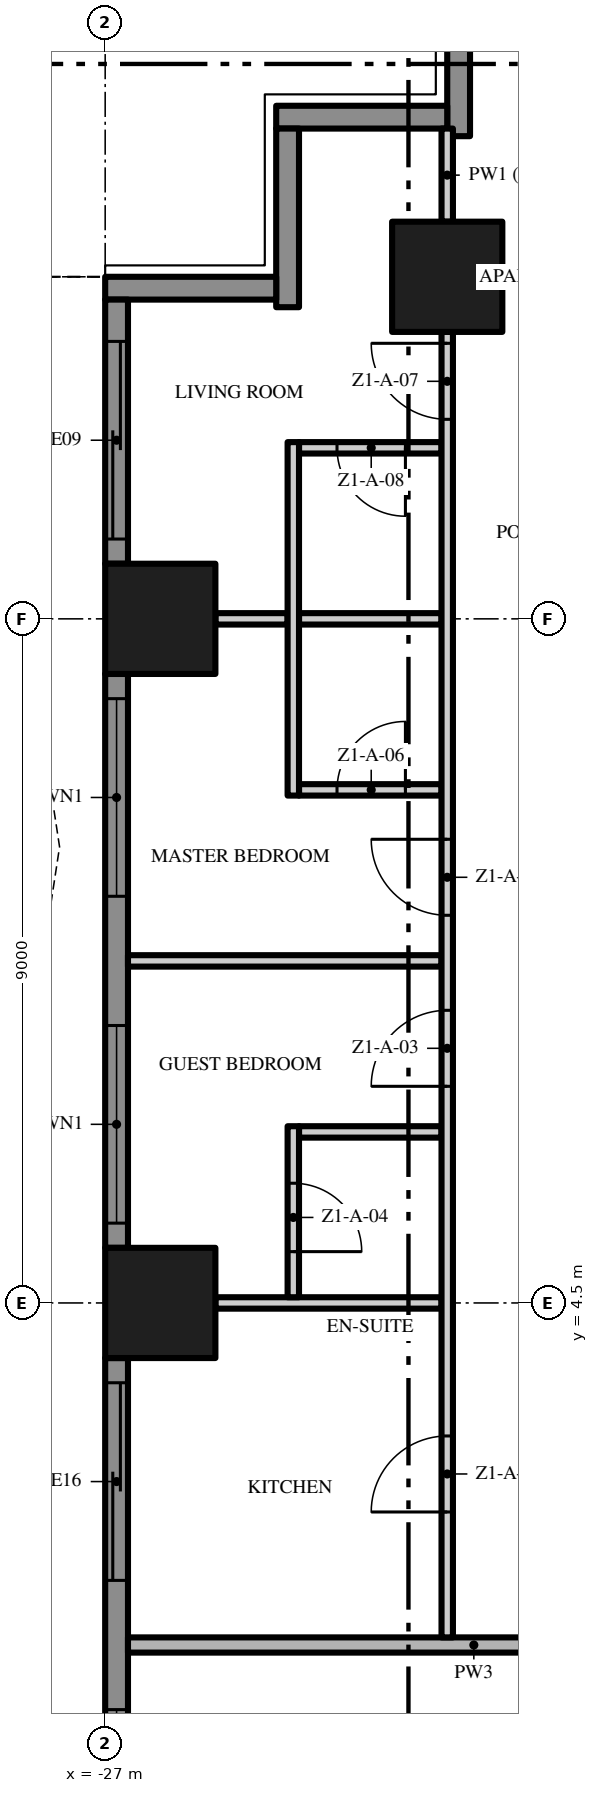
"""IFC4 building model, lengths in metres.
Left out: names, types, materials, properties, quantities, classifications, styles, units other than length and angle.
Written with IfcOpenShell. Run it as: python <this file> out.ifc"""

import sys

from ifc_helpers import new_model, si_unit, direction, frame, frame_2d, origin, origin_2d, place, context, subcontext, project, spatial, polyline, rectangle, outline, extrude, element, fill, save


model = new_model("IFC4")
c1 = context("Model", 3, precision=1e-05, world=origin(), true_north=direction((0.0, 1.0)))
c2 = subcontext(c1, "Body", "Model", "MODEL_VIEW")
j1 = project(units=[si_unit("LENGTHUNIT", "METRE"), si_unit("PLANEANGLEUNIT", "RADIAN")], contexts=[c1])
p1 = place(None, origin())
s1 = spatial("IfcSite", under=j1, at=p1, CompositionType="ELEMENT")
p2 = place(p1, origin())
s2 = spatial("IfcBuilding", under=s1, at=p2, CompositionType="ELEMENT")
p3 = place(p2, frame((0.0, 0.0, 22.6)))
s3 = spatial("IfcBuildingStorey", under=s2, at=p3, CompositionType="ELEMENT", Elevation=22.6)
for number, where, z_axis, x_axis in (
    (1, (-26.275, 13.5, 0.0), (0.0, 0.0, 1.0), (1.0, 0.0, 0.0)),
    (2, (-22.5, 18.0, 0.0), (0.0, 0.0, 1.0), (1.0, 0.0, 0.0)),
    (3, (-26.275, 4.5, 0.0), (0.0, 0.0, 1.0), (1.0, 0.0, 0.0)),
):
    element("IfcColumn", number, at=place(p3, frame(where, z_axis=z_axis, x_axis=x_axis)), inside=s3, PredefinedType="COLUMN", context=c2, shape_type="SweptSolid", body=[
        extrude(rectangle(XDim=1.45, YDim=1.45, at=origin_2d()), origin(), (0.0, 0.0, 1.0), 3.5),
    ])
p4 = place(p3, frame((-22.35, 19.85, 0.0), z_axis=(0.0, 0.0, 1.0), x_axis=(0.0, 1.0, 0.0)))
e4 = element("IfcWall", 4, at=p4, inside=s3, PredefinedType="SOLIDWALL", context=c2, shape_type="SweptSolid", body=[
    extrude(rectangle(XDim=2.35, YDim=0.3, at=frame_2d((1.175, 0.0))), origin(), (0.0, 0.0, 1.0), 3.5),
])
p5 = place(p3, frame((-24.75, 20.1, 0.0), z_axis=(0.0, 0.0, 1.0), x_axis=(1.0, 0.0, 0.0)))
e5 = element("IfcWall", 5, at=p5, inside=s3, PredefinedType="SOLIDWALL", context=c2, shape_type="SweptSolid", body=[
    extrude(rectangle(XDim=2.25, YDim=0.3, at=frame_2d((1.125, 0.0))), origin(), (0.0, 0.0, 1.0), 3.5),
])
p6 = place(p3, frame((-24.6, 17.6, 0.0), z_axis=(0.0, 0.0, 1.0), x_axis=(0.0, 1.0, 0.0)))
e6 = element("IfcWall", 6, at=p6, inside=s3, PredefinedType="SOLIDWALL", context=c2, shape_type="SweptSolid", body=[
    extrude(rectangle(XDim=2.35, YDim=0.3, at=frame_2d((1.175, 0.0))), origin(), (0.0, 0.0, 1.0), 3.5),
])
p7 = place(p3, frame((-27.0, 17.85, 0.0), z_axis=(0.0, 0.0, 1.0), x_axis=(1.0, 0.0, 0.0)))
e7 = element("IfcWall", 7, at=p7, inside=s3, PredefinedType="SOLIDWALL", context=c2, shape_type="SweptSolid", body=[
    extrude(rectangle(XDim=2.25, YDim=0.3, at=frame_2d((1.125, 0.0))), origin(), (0.0, 0.0, 1.0), 3.5),
])
p8 = place(p3, frame((-26.85, 14.225, 0.0), z_axis=(0.0, 0.0, 1.0), x_axis=(0.0, 1.0, 0.0)))
e8 = element("IfcWall", 8, at=p8, inside=s3, PredefinedType="SOLIDWALL", context=c2, shape_type="SweptSolid", body=[
    extrude(rectangle(XDim=3.475, YDim=0.3, at=frame_2d((1.738, 0.0))), origin(), (0.0, 0.0, 1.0), 3.5),
])
p9 = place(p8, frame((0.325, 0.0, 0.0)))
e9 = element("IfcOpeningElement", 9, at=p9, cuts=e8, PredefinedType="OPENING", context=c2, shape_type="SweptSolid", body=[
    extrude(rectangle(XDim=2.6, YDim=2.4, at=frame_2d((1.3, 1.2))), frame((0.0, 0.16, 0.0), z_axis=(0.0, -1.0, 0.0), x_axis=(1.0, 0.0, 0.0)), (0.0, 0.0, 1.0), 0.32),
])
p10 = place(p3, frame((-26.85, 5.225, 0.0), z_axis=(0.0, 0.0, 1.0), x_axis=(0.0, 1.0, 0.0)))
e10 = element("IfcWall", 10, at=p10, inside=s3, PredefinedType="SOLIDWALL", context=c2, shape_type="SweptSolid", body=[
    extrude(rectangle(XDim=7.55, YDim=0.3, at=frame_2d((3.775, 0.0))), origin(), (0.0, 0.0, 1.0), 3.5),
])
p11 = place(p10, frame((4.625, 0.0, 0.45)))
e11 = element("IfcOpeningElement", 11, at=p11, cuts=e10, PredefinedType="OPENING", context=c2, shape_type="SweptSolid", body=[
    extrude(rectangle(XDim=2.6, YDim=2.65, at=frame_2d((1.3, 1.325))), frame((0.0, 0.16, 0.0), z_axis=(0.0, -1.0, 0.0), x_axis=(1.0, 0.0, 0.0)), (0.0, 0.0, 1.0), 0.32),
])
p12 = place(p10, frame((0.325, 0.0, 0.45)))
e12 = element("IfcOpeningElement", 12, at=p12, cuts=e10, PredefinedType="OPENING", context=c2, shape_type="SweptSolid", body=[
    extrude(rectangle(XDim=2.6, YDim=2.65, at=frame_2d((1.3, 1.325))), frame((0.0, 0.16, 0.0), z_axis=(0.0, -1.0, 0.0), x_axis=(1.0, 0.0, 0.0)), (0.0, 0.0, 1.0), 0.32),
])
p13 = place(p3, frame((-26.85, -3.775, 0.0), z_axis=(0.0, 0.0, 1.0), x_axis=(0.0, 1.0, 0.0)))
e13 = element("IfcWall", 13, at=p13, inside=s3, PredefinedType="SOLIDWALL", context=c2, shape_type="SweptSolid", body=[
    extrude(rectangle(XDim=7.55, YDim=0.3, at=frame_2d((3.775, 0.0))), origin(), (0.0, 0.0, 1.0), 3.5),
])
p14 = place(p13, frame((4.625, 0.0, 0.0)))
e14 = element("IfcOpeningElement", 14, at=p14, cuts=e13, PredefinedType="OPENING", context=c2, shape_type="SweptSolid", body=[
    extrude(rectangle(XDim=2.6, YDim=2.4, at=frame_2d((1.3, 1.2))), frame((0.0, 0.16, 0.0), z_axis=(0.0, -1.0, 0.0), x_axis=(1.0, 0.0, 0.0)), (0.0, 0.0, 1.0), 0.32),
])
p15 = place(p13, frame((0.325, 0.0, 0.45)))
e15 = element("IfcOpeningElement", 15, at=p15, cuts=e13, PredefinedType="OPENING", context=c2, shape_type="SweptSolid", body=[
    extrude(rectangle(XDim=2.6, YDim=2.65, at=frame_2d((1.3, 1.325))), frame((0.0, 0.16, 0.0), z_axis=(0.0, -1.0, 0.0), x_axis=(1.0, 0.0, 0.0)), (0.0, 0.0, 1.0), 0.32),
])
p16 = place(p3, origin())
e16 = element("IfcWall", 16, at=p16, inside=s3, PredefinedType="USERDEFINED", context=c2, shape_type="SweptSolid", body=[
    extrude(outline(polyline([(-30.0, 18.0), (-29.771, 16.5), (-29.171, 15.0), (-28.429, 13.5), (-27.829, 12.0), (-27.6, 10.5), (-27.829, 9.0), (-28.429, 7.5), (-29.171, 6.0), (-29.771, 4.5), (-30.0, 3.0), (-29.771, 1.5), (-29.171, 0.0), (-28.429, -1.5), (-27.829, -3.0), (-27.6, -4.5), (-27.829, -6.0), (-28.429, -7.5), (-29.171, -9.0), (-29.771, -10.5), (-30.0, -12.0), (-29.771, -13.5), (-29.171, -15.0), (-28.429, -16.5), (-27.829, -18.0), (-27.597, -17.907), (-28.201, -16.398), (-28.942, -14.898), (-29.528, -13.434), (-29.747, -12.0), (-29.528, -10.566), (-28.942, -9.102), (-28.201, -7.602), (-27.586, -6.066), (-27.347, -4.5), (-27.586, -2.934), (-28.201, -1.398), (-28.942, 0.102), (-29.528, 1.566), (-29.747, 3.0), (-29.528, 4.434), (-28.942, 5.898), (-28.201, 7.398), (-27.586, 8.934), (-27.347, 10.5), (-27.586, 12.066), (-28.201, 13.602), (-28.942, 15.102), (-29.528, 16.566), (-29.753, 18.038), (-30.0, 18.0)])), origin(), (0.0, 0.0, 1.0), 0.9),
])
p17 = place(p3, frame((-26.7, 0.0, 0.0), z_axis=(0.0, 0.0, 1.0), x_axis=(1.0, 0.0, 0.0)))
e17 = element("IfcWall", 17, at=p17, inside=s3, PredefinedType="PARTITIONING", context=c2, shape_type="SweptSolid", body=[
    extrude(rectangle(XDim=9.1, YDim=0.2, at=frame_2d((4.55, 0.0))), origin(), (0.0, 0.0, 1.0), 3.5),
])
p18 = place(p3, frame((-25.55, 4.5, 0.0), z_axis=(0.0, 0.0, 1.0), x_axis=(1.0, 0.0, 0.0)))
e18 = element("IfcWall", 18, at=p18, inside=s3, PredefinedType="PARTITIONING", context=c2, shape_type="SweptSolid", body=[
    extrude(rectangle(XDim=2.975, YDim=0.15, at=frame_2d((1.488, 0.0))), origin(), (0.0, 0.0, 1.0), 3.5),
])
p19 = place(p3, frame((-24.45, 6.75, 0.0), z_axis=(0.0, 0.0, 1.0), x_axis=(1.0, 0.0, 0.0)))
e19 = element("IfcWall", 19, at=p19, inside=s3, PredefinedType="PARTITIONING", context=c2, shape_type="SweptSolid", body=[
    extrude(rectangle(XDim=1.875, YDim=0.15, at=frame_2d((0.938, 0.0))), origin(), (0.0, 0.0, 1.0), 3.5),
])
p20 = place(p3, frame((-26.7, 9.0, 0.0), z_axis=(0.0, 0.0, 1.0), x_axis=(1.0, 0.0, 0.0)))
e20 = element("IfcWall", 20, at=p20, inside=s3, PredefinedType="PARTITIONING", context=c2, shape_type="SweptSolid", body=[
    extrude(rectangle(XDim=4.125, YDim=0.15, at=frame_2d((2.062, 0.0))), origin(), (0.0, 0.0, 1.0), 3.5),
])
p21 = place(p3, frame((-24.45, 11.25, 0.0), z_axis=(0.0, 0.0, 1.0), x_axis=(1.0, 0.0, 0.0)))
e21 = element("IfcWall", 21, at=p21, inside=s3, PredefinedType="PARTITIONING", context=c2, shape_type="SweptSolid", body=[
    extrude(rectangle(XDim=1.875, YDim=0.15, at=frame_2d((0.938, 0.0))), origin(), (0.0, 0.0, 1.0), 3.5),
])
p22 = place(p21, frame((0.5, 0.0, 0.0)))
e22 = element("IfcOpeningElement", 22, at=p22, cuts=e21, PredefinedType="OPENING", context=c2, shape_type="SweptSolid", body=[
    extrude(rectangle(XDim=0.9, YDim=2.1, at=frame_2d((0.45, 1.05))), frame((0.0, 0.085, 0.0), z_axis=(0.0, -1.0, 0.0), x_axis=(1.0, 0.0, 0.0)), (0.0, 0.0, 1.0), 0.17),
])
p23 = place(p3, frame((-25.55, 13.5, 0.0), z_axis=(0.0, 0.0, 1.0), x_axis=(1.0, 0.0, 0.0)))
e23 = element("IfcWall", 23, at=p23, inside=s3, PredefinedType="PARTITIONING", context=c2, shape_type="SweptSolid", body=[
    extrude(rectangle(XDim=0.95, YDim=0.15, at=frame_2d((0.475, 0.0))), origin(), (0.0, 0.0, 1.0), 3.5),
])
p24 = place(p3, frame((-24.45, 13.5, 0.0), z_axis=(0.0, 0.0, 1.0), x_axis=(1.0, 0.0, 0.0)))
e24 = element("IfcWall", 24, at=p24, inside=s3, PredefinedType="PARTITIONING", context=c2, shape_type="SweptSolid", body=[
    extrude(rectangle(XDim=1.875, YDim=0.15, at=frame_2d((0.938, 0.0))), origin(), (0.0, 0.0, 1.0), 3.5),
])
p25 = place(p3, frame((-22.575, 15.75, 0.0), z_axis=(0.0, 0.0, 1.0), x_axis=(-1.0, 0.0, 0.0)))
e25 = element("IfcWall", 25, at=p25, inside=s3, PredefinedType="PARTITIONING", context=c2, shape_type="SweptSolid", body=[
    extrude(rectangle(XDim=1.875, YDim=0.15, at=frame_2d((0.938, 0.0))), origin(), (0.0, 0.0, 1.0), 3.5),
])
p26 = place(p25, frame((0.475, 0.0, 0.0)))
e26 = element("IfcOpeningElement", 26, at=p26, cuts=e25, PredefinedType="OPENING", context=c2, shape_type="SweptSolid", body=[
    extrude(rectangle(XDim=0.9, YDim=2.1, at=frame_2d((0.45, 1.05))), frame((0.0, 0.085, 0.0), z_axis=(0.0, -1.0, 0.0), x_axis=(1.0, 0.0, 0.0)), (0.0, 0.0, 1.0), 0.17),
])
p27 = place(p3, frame((-24.525, 6.825, 0.0), z_axis=(0.0, 0.0, 1.0), x_axis=(0.0, -1.0, 0.0)))
e27 = element("IfcWall", 27, at=p27, inside=s3, PredefinedType="PARTITIONING", context=c2, shape_type="SweptSolid", body=[
    extrude(rectangle(XDim=2.25, YDim=0.15, at=frame_2d((1.125, 0.0))), origin(), (0.0, 0.0, 1.0), 3.5),
])
p28 = place(p27, frame((0.75, 0.0, 0.0)))
e28 = element("IfcOpeningElement", 28, at=p28, cuts=e27, PredefinedType="OPENING", context=c2, shape_type="SweptSolid", body=[
    extrude(rectangle(XDim=0.9, YDim=2.1, at=frame_2d((0.45, 1.05))), frame((0.0, 0.085, 0.0), z_axis=(0.0, -1.0, 0.0), x_axis=(1.0, 0.0, 0.0)), (0.0, 0.0, 1.0), 0.17),
])
p29 = place(p3, frame((-24.525, 11.175, 0.0), z_axis=(0.0, 0.0, 1.0), x_axis=(0.0, 1.0, 0.0)))
e29 = element("IfcWall", 29, at=p29, inside=s3, PredefinedType="PARTITIONING", context=c2, shape_type="SweptSolid", body=[
    extrude(rectangle(XDim=4.65, YDim=0.15, at=frame_2d((2.325, 0.0))), origin(), (0.0, 0.0, 1.0), 3.5),
])
p30 = place(p3, frame((-22.5, 0.1, 0.0), z_axis=(0.0, 0.0, 1.0), x_axis=(0.0, 1.0, 0.0)))
e30 = element("IfcWall", 30, at=p30, inside=s3, PredefinedType="PARTITIONING", context=c2, shape_type="SweptSolid", body=[
    extrude(rectangle(XDim=17.175, YDim=0.15, at=frame_2d((8.588, 0.0))), origin(), (0.0, 0.0, 1.0), 3.5),
])
p31 = place(p30, frame((1.65, 0.0, 0.0)))
e31 = element("IfcOpeningElement", 31, at=p31, cuts=e30, PredefinedType="OPENING", context=c2, shape_type="SweptSolid", body=[
    extrude(rectangle(XDim=1.0, YDim=2.4, at=frame_2d((0.5, 1.2))), frame((0.0, 0.085, 0.0), z_axis=(0.0, -1.0, 0.0), x_axis=(1.0, 0.0, 0.0)), (0.0, 0.0, 1.0), 0.17),
])
p32 = place(p30, frame((7.25, 0.0, 0.0)))
e32 = element("IfcOpeningElement", 32, at=p32, cuts=e30, PredefinedType="OPENING", context=c2, shape_type="SweptSolid", body=[
    extrude(rectangle(XDim=1.0, YDim=2.4, at=frame_2d((0.5, 1.2))), frame((0.0, 0.085, 0.0), z_axis=(0.0, -1.0, 0.0), x_axis=(1.0, 0.0, 0.0)), (0.0, 0.0, 1.0), 0.17),
])
p33 = place(p30, frame((9.5, 0.0, 0.0)))
e33 = element("IfcOpeningElement", 33, at=p33, cuts=e30, PredefinedType="OPENING", context=c2, shape_type="SweptSolid", body=[
    extrude(rectangle(XDim=1.0, YDim=2.4, at=frame_2d((0.5, 1.2))), frame((0.0, 0.085, 0.0), z_axis=(0.0, -1.0, 0.0), x_axis=(1.0, 0.0, 0.0)), (0.0, 0.0, 1.0), 0.17),
])
p34 = place(p30, frame((16.025, 0.0, 0.0)))
e34 = element("IfcOpeningElement", 34, at=p34, cuts=e30, PredefinedType="OPENING", context=c2, shape_type="SweptSolid", body=[
    extrude(rectangle(XDim=1.0, YDim=2.4, at=frame_2d((0.5, 1.2))), frame((0.0, 0.085, 0.0), z_axis=(0.0, -1.0, 0.0), x_axis=(1.0, 0.0, 0.0)), (0.0, 0.0, 1.0), 0.17),
])
p35 = place(p3, frame((-22.5, 18.725, 0.0), z_axis=(0.0, 0.0, 1.0), x_axis=(0.0, 1.0, 0.0)))
e35 = element("IfcWall", 35, at=p35, inside=s3, PredefinedType="PARTITIONING", context=c2, shape_type="SweptSolid", body=[
    extrude(rectangle(XDim=1.225, YDim=0.15, at=frame_2d((0.613, 0.0))), origin(), (0.0, 0.0, 1.0), 3.5),
])
p36 = place(p9, origin())
e36 = element("IfcDoor", 36, at=p36, inside=s3, OperationType="SINGLE_SWING_LEFT", PredefinedType="DOOR", context=c2, shape_type="SweptSolid", body=[
    extrude(rectangle(XDim=2.6, YDim=2.4, at=frame_2d((1.3, 1.2))), frame((0.0, 0.025, 0.0), z_axis=(0.0, -1.0, 0.0), x_axis=(1.0, 0.0, 0.0)), (0.0, 0.0, 1.0), 0.05),
])
fill(e9, e36)
p37 = place(p11, origin())
e37 = element("IfcWindow", 37, at=p37, inside=s3, PartitioningType="SINGLE_PANEL", PredefinedType="WINDOW", context=c2, shape_type="SweptSolid", body=[
    extrude(rectangle(XDim=2.6, YDim=2.65, at=frame_2d((1.3, 1.325))), frame((0.0, 0.03, 0.0), z_axis=(0.0, -1.0, 0.0), x_axis=(1.0, 0.0, 0.0)), (0.0, 0.0, 1.0), 0.06),
])
fill(e11, e37)
p38 = place(p12, origin())
e38 = element("IfcWindow", 38, at=p38, inside=s3, PartitioningType="SINGLE_PANEL", PredefinedType="WINDOW", context=c2, shape_type="SweptSolid", body=[
    extrude(rectangle(XDim=2.6, YDim=2.65, at=frame_2d((1.3, 1.325))), frame((0.0, 0.03, 0.0), z_axis=(0.0, -1.0, 0.0), x_axis=(1.0, 0.0, 0.0)), (0.0, 0.0, 1.0), 0.06),
])
fill(e12, e38)
p39 = place(p14, origin())
e39 = element("IfcDoor", 39, at=p39, inside=s3, OperationType="SINGLE_SWING_LEFT", PredefinedType="DOOR", context=c2, shape_type="SweptSolid", body=[
    extrude(rectangle(XDim=2.6, YDim=2.4, at=frame_2d((1.3, 1.2))), frame((0.0, 0.025, 0.0), z_axis=(0.0, -1.0, 0.0), x_axis=(1.0, 0.0, 0.0)), (0.0, 0.0, 1.0), 0.05),
])
fill(e14, e39)
p40 = place(p15, origin())
e40 = element("IfcWindow", 40, at=p40, inside=s3, PartitioningType="SINGLE_PANEL", PredefinedType="WINDOW", context=c2, shape_type="SweptSolid", body=[
    extrude(rectangle(XDim=2.6, YDim=2.65, at=frame_2d((1.3, 1.325))), frame((0.0, 0.03, 0.0), z_axis=(0.0, -1.0, 0.0), x_axis=(1.0, 0.0, 0.0)), (0.0, 0.0, 1.0), 0.06),
])
fill(e15, e40)
p41 = place(p31, origin())
e41 = element("IfcDoor", 41, at=p41, inside=s3, OperationType="SINGLE_SWING_LEFT", PredefinedType="DOOR", context=c2, shape_type="SweptSolid", body=[
    extrude(rectangle(XDim=1.0, YDim=2.4, at=frame_2d((0.5, 1.2))), frame((0.0, 0.025, 0.0), z_axis=(0.0, -1.0, 0.0), x_axis=(1.0, 0.0, 0.0)), (0.0, 0.0, 1.0), 0.05),
])
fill(e31, e41)
p42 = place(p32, origin())
e42 = element("IfcDoor", 42, at=p42, inside=s3, OperationType="SINGLE_SWING_LEFT", PredefinedType="DOOR", context=c2, shape_type="SweptSolid", body=[
    extrude(rectangle(XDim=1.0, YDim=2.4, at=frame_2d((0.5, 1.2))), frame((0.0, 0.025, 0.0), z_axis=(0.0, -1.0, 0.0), x_axis=(1.0, 0.0, 0.0)), (0.0, 0.0, 1.0), 0.05),
])
fill(e32, e42)
p43 = place(p28, origin())
e43 = element("IfcDoor", 43, at=p43, inside=s3, OperationType="SINGLE_SWING_RIGHT", PredefinedType="DOOR", context=c2, shape_type="SweptSolid", body=[
    extrude(rectangle(XDim=0.9, YDim=2.1, at=frame_2d((0.45, 1.05))), frame((0.0, 0.025, 0.0), z_axis=(0.0, -1.0, 0.0), x_axis=(1.0, 0.0, 0.0)), (0.0, 0.0, 1.0), 0.05),
])
fill(e28, e43)
p44 = place(p33, origin())
e44 = element("IfcDoor", 44, at=p44, inside=s3, OperationType="SINGLE_SWING_RIGHT", PredefinedType="DOOR", context=c2, shape_type="SweptSolid", body=[
    extrude(rectangle(XDim=1.0, YDim=2.4, at=frame_2d((0.5, 1.2))), frame((0.0, 0.025, 0.0), z_axis=(0.0, -1.0, 0.0), x_axis=(1.0, 0.0, 0.0)), (0.0, 0.0, 1.0), 0.05),
])
fill(e33, e44)
p45 = place(p22, origin())
e45 = element("IfcDoor", 45, at=p45, inside=s3, OperationType="SINGLE_SWING_RIGHT", PredefinedType="DOOR", context=c2, shape_type="SweptSolid", body=[
    extrude(rectangle(XDim=0.9, YDim=2.1, at=frame_2d((0.45, 1.05))), frame((0.0, 0.025, 0.0), z_axis=(0.0, -1.0, 0.0), x_axis=(1.0, 0.0, 0.0)), (0.0, 0.0, 1.0), 0.05),
])
fill(e22, e45)
p46 = place(p34, origin())
e46 = element("IfcDoor", 46, at=p46, inside=s3, OperationType="SINGLE_SWING_RIGHT", PredefinedType="DOOR", context=c2, shape_type="SweptSolid", body=[
    extrude(rectangle(XDim=1.0, YDim=2.4, at=frame_2d((0.5, 1.2))), frame((0.0, 0.025, 0.0), z_axis=(0.0, -1.0, 0.0), x_axis=(1.0, 0.0, 0.0)), (0.0, 0.0, 1.0), 0.05),
])
fill(e34, e46)
p47 = place(p26, origin())
e47 = element("IfcDoor", 47, at=p47, inside=s3, OperationType="SINGLE_SWING_LEFT", PredefinedType="DOOR", context=c2, shape_type="SweptSolid", body=[
    extrude(rectangle(XDim=0.9, YDim=2.1, at=frame_2d((0.45, 1.05))), frame((0.0, 0.025, 0.0), z_axis=(0.0, -1.0, 0.0), x_axis=(1.0, 0.0, 0.0)), (0.0, 0.0, 1.0), 0.05),
])
fill(e26, e47)
save(model, sys.argv[1])
